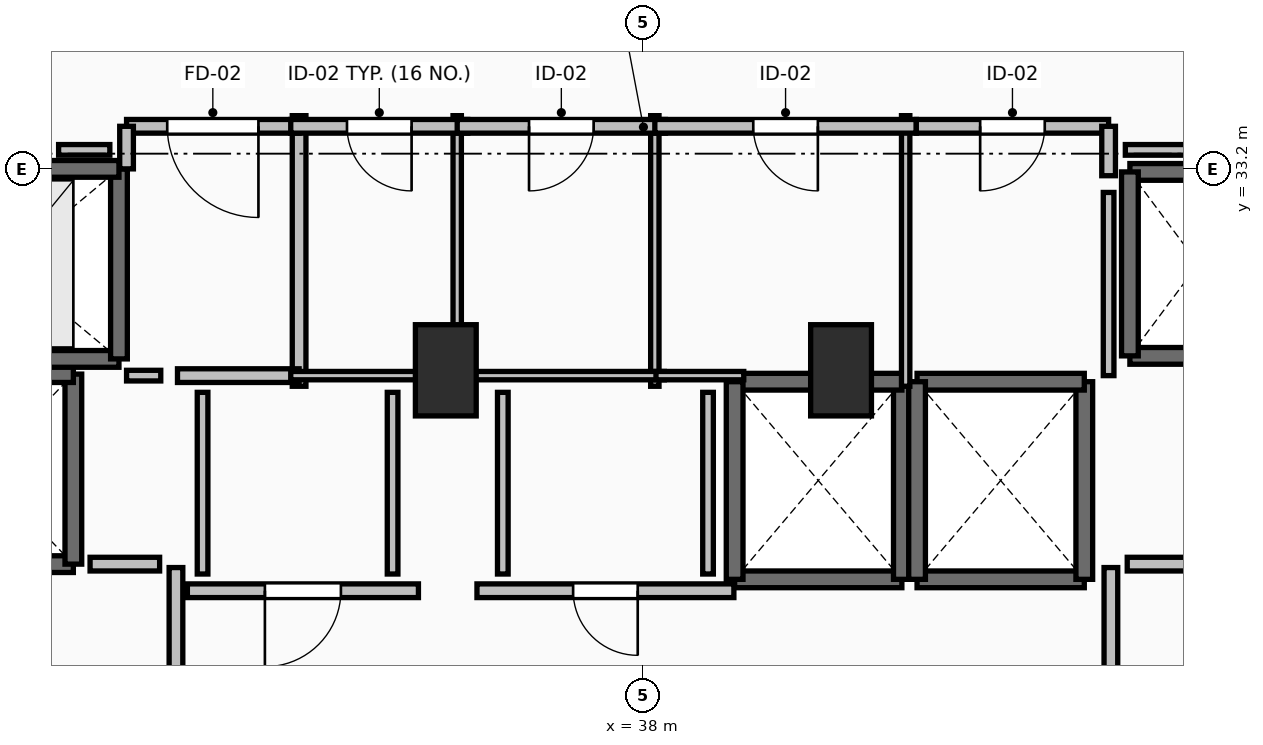
"""IFC4 building model, lengths in metres.
Left out: names, types, materials, properties, quantities, classifications, styles, units other than length and angle.
Written with IfcOpenShell. Run it as: python <this file> out.ifc"""

import sys

from ifc_helpers import new_model, si_unit, direction, frame, frame_2d, origin, origin_2d, place, context, subcontext, project, spatial, rectangle, extrude, element, fill, save


model = new_model("IFC4")
c1 = context("Model", 3, precision=1e-05, world=origin(), true_north=direction((0.0, 1.0)))
c2 = subcontext(c1, "Body", "Model", "MODEL_VIEW")
j1 = project(units=[si_unit("LENGTHUNIT", "METRE"), si_unit("PLANEANGLEUNIT", "RADIAN")], contexts=[c1])
p1 = place(None, origin())
s1 = spatial("IfcSite", under=j1, at=p1, CompositionType="ELEMENT")
p2 = place(p1, origin())
s2 = spatial("IfcBuilding", under=s1, at=p2, CompositionType="ELEMENT")
p3 = place(p2, frame((0.0, 0.0, 132.6)))
s3 = spatial("IfcBuildingStorey", under=s2, at=p3, CompositionType="ELEMENT", Elevation=132.6)
for number, where, z_axis, x_axis in (
    (1, (35.4, 30.55, 0.0), (0.0, 0.0, 1.0), (1.0, 0.0, 0.0)),
    (2, (40.6, 30.55, 0.0), (0.0, 0.0, 1.0), (1.0, 0.0, 0.0)),
):
    element("IfcColumn", number, at=place(p3, frame(where, z_axis=z_axis, x_axis=x_axis)), inside=s3, PredefinedType="PILASTER", context=c2, shape_type="SweptSolid", body=[
        extrude(rectangle(XDim=0.8, YDim=1.2, at=origin_2d()), origin(), (0.0, 0.0, 1.0), 3.5),
    ])
p4 = place(p3, frame((39.2, 27.8, 0.0), z_axis=(0.0, 0.0, 1.0), x_axis=(1.0, 0.0, 0.0)))
e3 = element("IfcWall", 3, at=p4, inside=s3, PredefinedType="SOLIDWALL", context=c2, shape_type="SweptSolid", body=[
    extrude(rectangle(XDim=2.2, YDim=0.22, at=frame_2d((1.1, 0.0))), origin(), (0.0, 0.0, 1.0), 3.24),
])
p5 = place(p3, frame((41.4, 27.8, 0.0), z_axis=(0.0, 0.0, 1.0), x_axis=(0.0, 1.0, 0.0)))
e4 = element("IfcWall", 4, at=p5, inside=s3, PredefinedType="SOLIDWALL", context=c2, shape_type="SweptSolid", body=[
    extrude(rectangle(XDim=2.6, YDim=0.22, at=frame_2d((1.3, 0.0))), origin(), (0.0, 0.0, 1.0), 3.24),
])
p6 = place(p3, frame((41.4, 30.4, 0.0), z_axis=(0.0, 0.0, 1.0), x_axis=(-1.0, 0.0, 0.0)))
e5 = element("IfcWall", 5, at=p6, inside=s3, PredefinedType="SOLIDWALL", context=c2, shape_type="SweptSolid", body=[
    extrude(rectangle(XDim=2.2, YDim=0.22, at=frame_2d((1.1, 0.0))), origin(), (0.0, 0.0, 1.0), 3.24),
])
p7 = place(p3, frame((39.2, 30.4, 0.0), z_axis=(0.0, 0.0, 1.0), x_axis=(0.0, -1.0, 0.0)))
e6 = element("IfcWall", 6, at=p7, inside=s3, PredefinedType="SOLIDWALL", context=c2, shape_type="SweptSolid", body=[
    extrude(rectangle(XDim=2.6, YDim=0.22, at=frame_2d((1.3, 0.0))), origin(), (0.0, 0.0, 1.0), 3.24),
])
p8 = place(p3, frame((41.6, 27.8, 0.0), z_axis=(0.0, 0.0, 1.0), x_axis=(1.0, 0.0, 0.0)))
e7 = element("IfcWall", 7, at=p8, inside=s3, PredefinedType="SOLIDWALL", context=c2, shape_type="SweptSolid", body=[
    extrude(rectangle(XDim=2.2, YDim=0.22, at=frame_2d((1.1, 0.0))), origin(), (0.0, 0.0, 1.0), 3.24),
])
p9 = place(p3, frame((43.8, 27.8, 0.0), z_axis=(0.0, 0.0, 1.0), x_axis=(0.0, 1.0, 0.0)))
e8 = element("IfcWall", 8, at=p9, inside=s3, PredefinedType="SOLIDWALL", context=c2, shape_type="SweptSolid", body=[
    extrude(rectangle(XDim=2.6, YDim=0.22, at=frame_2d((1.3, 0.0))), origin(), (0.0, 0.0, 1.0), 3.24),
])
p10 = place(p3, frame((43.8, 30.4, 0.0), z_axis=(0.0, 0.0, 1.0), x_axis=(-1.0, 0.0, 0.0)))
e9 = element("IfcWall", 9, at=p10, inside=s3, PredefinedType="SOLIDWALL", context=c2, shape_type="SweptSolid", body=[
    extrude(rectangle(XDim=2.2, YDim=0.22, at=frame_2d((1.1, 0.0))), origin(), (0.0, 0.0, 1.0), 3.24),
])
p11 = place(p3, frame((41.6, 30.4, 0.0), z_axis=(0.0, 0.0, 1.0), x_axis=(0.0, -1.0, 0.0)))
e10 = element("IfcWall", 10, at=p11, inside=s3, PredefinedType="SOLIDWALL", context=c2, shape_type="SweptSolid", body=[
    extrude(rectangle(XDim=2.6, YDim=0.22, at=frame_2d((1.3, 0.0))), origin(), (0.0, 0.0, 1.0), 3.24),
])
for number, where, z_axis, x_axis in (
    (11, (44.4, 30.74, 0.0), (0.0, 0.0, 1.0), (1.0, 0.0, 0.0)),
    (12, (46.2, 33.16, 0.0), (0.0, 0.0, 1.0), (-1.0, 0.0, 0.0)),
):
    element("IfcWall", number, at=place(p3, frame(where, z_axis=z_axis, x_axis=x_axis)), inside=s3, PredefinedType="SOLIDWALL", context=c2, shape_type="SweptSolid", body=[
        extrude(rectangle(XDim=1.8, YDim=0.22, at=frame_2d((0.9, 0.0))), origin(), (0.0, 0.0, 1.0), 3.24),
    ])
p12 = place(p3, frame((44.4, 33.16, 0.0), z_axis=(0.0, 0.0, 1.0), x_axis=(0.0, -1.0, 0.0)))
e13 = element("IfcWall", 13, at=p12, inside=s3, PredefinedType="SOLIDWALL", context=c2, shape_type="SweptSolid", body=[
    extrude(rectangle(XDim=2.42, YDim=0.22, at=frame_2d((1.21, 0.0))), origin(), (0.0, 0.0, 1.0), 3.24),
])
p13 = place(p3, frame((28.1, 28.0, 0.0), z_axis=(0.0, 0.0, 1.0), x_axis=(1.0, 0.0, 0.0)))
e14 = element("IfcWall", 14, at=p13, inside=s3, PredefinedType="SHEAR", context=c2, shape_type="SweptSolid", body=[
    extrude(rectangle(XDim=2.4, YDim=0.22, at=frame_2d((1.2, 0.0))), origin(), (0.0, 0.0, 1.0), 3.24),
])
p14 = place(p13, frame((0.6, 0.0, 0.0)))
e15 = element("IfcOpeningElement", 15, at=p14, cuts=e14, PredefinedType="OPENING", context=c2, shape_type="SweptSolid", body=[
    extrude(rectangle(XDim=1.2, YDim=2.2, at=frame_2d((0.6, 1.1))), frame((0.0, 0.125, 0.0), z_axis=(0.0, -1.0, 0.0), x_axis=(1.0, 0.0, 0.0)), (0.0, 0.0, 1.0), 0.25),
])
p15 = place(p3, frame((30.5, 28.0, 0.0), z_axis=(0.0, 0.0, 1.0), x_axis=(0.0, 1.0, 0.0)))
e16 = element("IfcWall", 16, at=p15, inside=s3, PredefinedType="SHEAR", context=c2, shape_type="SweptSolid", body=[
    extrude(rectangle(XDim=2.5, YDim=0.22, at=frame_2d((1.25, 0.0))), origin(), (0.0, 0.0, 1.0), 3.24),
])
p16 = place(p3, frame((30.5, 30.5, 0.0), z_axis=(0.0, 0.0, 1.0), x_axis=(-1.0, 0.0, 0.0)))
e17 = element("IfcWall", 17, at=p16, inside=s3, PredefinedType="SHEAR", context=c2, shape_type="SweptSolid", body=[
    extrude(rectangle(XDim=2.4, YDim=0.22, at=frame_2d((1.2, 0.0))), origin(), (0.0, 0.0, 1.0), 3.24),
])
p17 = place(p3, frame((28.1, 30.7, 0.0), z_axis=(0.0, 0.0, 1.0), x_axis=(1.0, 0.0, 0.0)))
e18 = element("IfcWall", 18, at=p17, inside=s3, PredefinedType="SOLIDWALL", context=c2, shape_type="SweptSolid", body=[
    extrude(rectangle(XDim=3.0, YDim=0.22, at=frame_2d((1.5, 0.0))), origin(), (0.0, 0.0, 1.0), 3.24),
])
p18 = place(p3, frame((31.1, 30.7, 0.0), z_axis=(0.0, 0.0, 1.0), x_axis=(0.0, 1.0, 0.0)))
e19 = element("IfcWall", 19, at=p18, inside=s3, PredefinedType="SOLIDWALL", context=c2, shape_type="SweptSolid", body=[
    extrude(rectangle(XDim=2.5, YDim=0.22, at=frame_2d((1.25, 0.0))), origin(), (0.0, 0.0, 1.0), 3.24),
])
p19 = place(p3, frame((31.1, 33.2, 0.0), z_axis=(0.0, 0.0, 1.0), x_axis=(-1.0, 0.0, 0.0)))
e20 = element("IfcWall", 20, at=p19, inside=s3, PredefinedType="SOLIDWALL", context=c2, shape_type="SweptSolid", body=[
    extrude(rectangle(XDim=3.0, YDim=0.22, at=frame_2d((1.5, 0.0))), origin(), (0.0, 0.0, 1.0), 3.24),
])
p20 = place(p19, frame((0.9, 0.0, 0.0)))
e21 = element("IfcOpeningElement", 21, at=p20, cuts=e20, PredefinedType="OPENING", context=c2, shape_type="SweptSolid", body=[
    extrude(rectangle(XDim=1.2, YDim=2.2, at=frame_2d((0.6, 1.1))), frame((0.0, 0.125, 0.0), z_axis=(0.0, -1.0, 0.0), x_axis=(1.0, 0.0, 0.0)), (0.0, 0.0, 1.0), 0.25),
])
p21 = place(p3, frame((31.85, 24.045, 0.0), z_axis=(0.0, 0.0, 1.0), x_axis=(0.0, 1.0, 0.0)))
e22 = element("IfcWall", 22, at=p21, inside=s3, PredefinedType="PARTITIONING", context=c2, shape_type="SweptSolid", body=[
    extrude(rectangle(XDim=3.91, YDim=0.18, at=frame_2d((1.955, 0.0))), origin(), (0.0, 0.0, 1.0), 3.24),
])
p22 = place(p21, frame((1.355, 0.0, 0.0)))
e23 = element("IfcOpeningElement", 23, at=p22, cuts=e22, PredefinedType="OPENING", context=c2, shape_type="SweptSolid", body=[
    extrude(rectangle(XDim=1.2, YDim=2.15, at=frame_2d((0.6, 1.075))), frame((0.0, 0.105, 0.0), z_axis=(0.0, -1.0, 0.0), x_axis=(1.0, 0.0, 0.0)), (0.0, 0.0, 1.0), 0.21),
])
p23 = place(p3, frame((44.15, 27.955, 0.0), z_axis=(0.0, 0.0, 1.0), x_axis=(0.0, -1.0, 0.0)))
e24 = element("IfcWall", 24, at=p23, inside=s3, PredefinedType="PARTITIONING", context=c2, shape_type="SweptSolid", body=[
    extrude(rectangle(XDim=3.91, YDim=0.18, at=frame_2d((1.955, 0.0))), origin(), (0.0, 0.0, 1.0), 3.24),
])
p24 = place(p23, frame((1.355, 0.0, 0.0)))
e25 = element("IfcOpeningElement", 25, at=p24, cuts=e24, PredefinedType="OPENING", context=c2, shape_type="SweptSolid", body=[
    extrude(rectangle(XDim=1.2, YDim=2.15, at=frame_2d((0.6, 1.075))), frame((0.0, 0.105, 0.0), z_axis=(0.0, -1.0, 0.0), x_axis=(1.0, 0.0, 0.0)), (0.0, 0.0, 1.0), 0.21),
])
p25 = place(p3, frame((33.47, 30.34, 0.0), z_axis=(0.0, 0.0, 1.0), x_axis=(0.0, 1.0, 0.0)))
e26 = element("IfcWall", 26, at=p25, inside=s3, PredefinedType="PARTITIONING", context=c2, shape_type="SweptSolid", body=[
    extrude(rectangle(XDim=3.56, YDim=0.18, at=frame_2d((1.78, 0.0))), origin(), (0.0, 0.0, 1.0), 3.24),
])
p26 = place(p3, frame((31.87, 30.48, 0.0), z_axis=(0.0, 0.0, 1.0), x_axis=(1.0, 0.0, 0.0)))
e27 = element("IfcWall", 27, at=p26, inside=s3, PredefinedType="PARTITIONING", context=c2, shape_type="SweptSolid", body=[
    extrude(rectangle(XDim=1.6, YDim=0.18, at=frame_2d((0.8, 0.0))), origin(), (0.0, 0.0, 1.0), 3.24),
])
p27 = place(p3, frame((33.47, 33.76, 0.0), z_axis=(0.0, 0.0, 1.0), x_axis=(-1.0, 0.0, 0.0)))
e28 = element("IfcWall", 28, at=p27, inside=s3, PredefinedType="PARTITIONING", context=c2, shape_type="SweptSolid", body=[
    extrude(rectangle(XDim=2.27, YDim=0.18, at=frame_2d((1.135, 0.0))), origin(), (0.0, 0.0, 1.0), 3.24),
])
p28 = place(p27, frame((0.535, 0.0, 0.0)))
e29 = element("IfcOpeningElement", 29, at=p28, cuts=e28, PredefinedType="OPENING", context=c2, shape_type="SweptSolid", body=[
    extrude(rectangle(XDim=1.2, YDim=2.15, at=frame_2d((0.6, 1.075))), frame((0.0, 0.105, 0.0), z_axis=(0.0, -1.0, 0.0), x_axis=(1.0, 0.0, 0.0)), (0.0, 0.0, 1.0), 0.21),
])
p29 = place(p3, frame((31.2, 33.76, 0.0), z_axis=(0.0, 0.0, 1.0), x_axis=(0.0, -1.0, 0.0)))
e30 = element("IfcWall", 30, at=p29, inside=s3, PredefinedType="PARTITIONING", context=c2, shape_type="SweptSolid", body=[
    extrude(rectangle(XDim=0.56, YDim=0.18, at=frame_2d((0.28, 0.0))), origin(), (0.0, 0.0, 1.0), 3.24),
])
p30 = place(p3, frame((35.04, 27.65, 0.0), z_axis=(0.0, 0.0, 1.0), x_axis=(-1.0, 0.0, 0.0)))
e31 = element("IfcWall", 31, at=p30, inside=s3, PredefinedType="PARTITIONING", context=c2, shape_type="SweptSolid", body=[
    extrude(rectangle(XDim=3.04, YDim=0.18, at=frame_2d((1.52, 0.0))), origin(), (0.0, 0.0, 1.0), 3.24),
])
p31 = place(p30, frame((1.02, 0.0, 0.0)))
e32 = element("IfcOpeningElement", 32, at=p31, cuts=e31, PredefinedType="OPENING", context=c2, shape_type="SweptSolid", body=[
    extrude(rectangle(XDim=1.0, YDim=2.15, at=frame_2d((0.5, 1.075))), frame((0.0, 0.105, 0.0), z_axis=(0.0, -1.0, 0.0), x_axis=(1.0, 0.0, 0.0)), (0.0, 0.0, 1.0), 0.21),
])
p32 = place(p3, frame((39.19, 27.65, 0.0), z_axis=(0.0, 0.0, 1.0), x_axis=(-1.0, 0.0, 0.0)))
e33 = element("IfcWall", 33, at=p32, inside=s3, PredefinedType="PARTITIONING", context=c2, shape_type="SweptSolid", body=[
    extrude(rectangle(XDim=3.38, YDim=0.18, at=frame_2d((1.69, 0.0))), origin(), (0.0, 0.0, 1.0), 3.24),
])
p33 = place(p32, frame((1.265, 0.0, 0.0)))
e34 = element("IfcOpeningElement", 34, at=p33, cuts=e33, PredefinedType="OPENING", context=c2, shape_type="SweptSolid", body=[
    extrude(rectangle(XDim=0.85, YDim=2.1, at=frame_2d((0.425, 1.05))), frame((0.0, 0.105, 0.0), z_axis=(0.0, -1.0, 0.0), x_axis=(1.0, 0.0, 0.0)), (0.0, 0.0, 1.0), 0.21),
])
p34 = place(p3, frame((35.55, 30.34, 0.0), z_axis=(0.0, 0.0, 1.0), x_axis=(0.0, 1.0, 0.0)))
e35 = element("IfcWall", 35, at=p34, inside=s3, PredefinedType="PARTITIONING", context=c2, shape_type="SweptSolid", body=[
    extrude(rectangle(XDim=3.56, YDim=0.11, at=frame_2d((1.78, 0.0))), origin(), (0.0, 0.0, 1.0), 2.432),
])
p35 = place(p3, frame((33.36, 30.48, 0.0), z_axis=(0.0, 0.0, 1.0), x_axis=(1.0, 0.0, 0.0)))
e36 = element("IfcWall", 36, at=p35, inside=s3, PredefinedType="PARTITIONING", context=c2, shape_type="SweptSolid", body=[
    extrude(rectangle(XDim=1.81, YDim=0.11, at=frame_2d((0.905, 0.0))), origin(), (0.0, 0.0, 1.0), 3.24),
])
p36 = place(p3, frame((35.69, 33.76, 0.0), z_axis=(0.0, 0.0, 1.0), x_axis=(-1.0, 0.0, 0.0)))
e37 = element("IfcWall", 37, at=p36, inside=s3, PredefinedType="PARTITIONING", context=c2, shape_type="SweptSolid", body=[
    extrude(rectangle(XDim=2.33, YDim=0.18, at=frame_2d((1.165, 0.0))), origin(), (0.0, 0.0, 1.0), 3.24),
])
p37 = place(p36, frame((0.74, 0.0, 0.0)))
e38 = element("IfcOpeningElement", 38, at=p37, cuts=e37, PredefinedType="OPENING", context=c2, shape_type="SweptSolid", body=[
    extrude(rectangle(XDim=0.85, YDim=2.1, at=frame_2d((0.425, 1.05))), frame((0.0, 0.105, 0.0), z_axis=(0.0, -1.0, 0.0), x_axis=(1.0, 0.0, 0.0)), (0.0, 0.0, 1.0), 0.21),
])
p38 = place(p3, frame((38.15, 30.34, 0.0), z_axis=(0.0, 0.0, 1.0), x_axis=(0.0, 1.0, 0.0)))
e39 = element("IfcWall", 39, at=p38, inside=s3, PredefinedType="PARTITIONING", context=c2, shape_type="SweptSolid", body=[
    extrude(rectangle(XDim=3.56, YDim=0.11, at=frame_2d((1.78, 0.0))), origin(), (0.0, 0.0, 1.0), 2.432),
])
p39 = place(p3, frame((35.68, 30.48, 0.0), z_axis=(0.0, 0.0, 1.0), x_axis=(1.0, 0.0, 0.0)))
e40 = element("IfcWall", 40, at=p39, inside=s3, PredefinedType="PARTITIONING", context=c2, shape_type="SweptSolid", body=[
    extrude(rectangle(XDim=2.595, YDim=0.11, at=frame_2d((1.297, 0.0))), origin(), (0.0, 0.0, 1.0), 2.432),
])
p40 = place(p3, frame((38.29, 33.76, 0.0), z_axis=(0.0, 0.0, 1.0), x_axis=(-1.0, 0.0, 0.0)))
e41 = element("IfcWall", 41, at=p40, inside=s3, PredefinedType="PARTITIONING", context=c2, shape_type="SweptSolid", body=[
    extrude(rectangle(XDim=2.74, YDim=0.18, at=frame_2d((1.37, 0.0))), origin(), (0.0, 0.0, 1.0), 3.24),
])
p41 = place(p40, frame((0.945, 0.0, 0.0)))
e42 = element("IfcOpeningElement", 42, at=p41, cuts=e41, PredefinedType="OPENING", context=c2, shape_type="SweptSolid", body=[
    extrude(rectangle(XDim=0.85, YDim=2.1, at=frame_2d((0.425, 1.05))), frame((0.0, 0.105, 0.0), z_axis=(0.0, -1.0, 0.0), x_axis=(1.0, 0.0, 0.0)), (0.0, 0.0, 1.0), 0.21),
])
p42 = place(p3, frame((41.45, 30.34, 0.0), z_axis=(0.0, 0.0, 1.0), x_axis=(0.0, 1.0, 0.0)))
e43 = element("IfcWall", 43, at=p42, inside=s3, PredefinedType="PARTITIONING", context=c2, shape_type="SweptSolid", body=[
    extrude(rectangle(XDim=3.56, YDim=0.11, at=frame_2d((1.78, 0.0))), origin(), (0.0, 0.0, 1.0), 3.24),
])
p43 = place(p3, frame((38.165, 30.48, 0.0), z_axis=(0.0, 0.0, 1.0), x_axis=(1.0, 0.0, 0.0)))
e44 = element("IfcWall", 44, at=p43, inside=s3, PredefinedType="PARTITIONING", context=c2, shape_type="SweptSolid", body=[
    extrude(rectangle(XDim=1.155, YDim=0.11, at=frame_2d((0.578, 0.0))), origin(), (0.0, 0.0, 1.0), 2.432),
])
p44 = place(p3, frame((41.59, 33.76, 0.0), z_axis=(0.0, 0.0, 1.0), x_axis=(-1.0, 0.0, 0.0)))
e45 = element("IfcWall", 45, at=p44, inside=s3, PredefinedType="PARTITIONING", context=c2, shape_type="SweptSolid", body=[
    extrude(rectangle(XDim=3.44, YDim=0.18, at=frame_2d((1.72, 0.0))), origin(), (0.0, 0.0, 1.0), 3.24),
])
p45 = place(p44, frame((1.295, 0.0, 0.0)))
e46 = element("IfcOpeningElement", 46, at=p45, cuts=e45, PredefinedType="OPENING", context=c2, shape_type="SweptSolid", body=[
    extrude(rectangle(XDim=0.85, YDim=2.1, at=frame_2d((0.425, 1.05))), frame((0.0, 0.105, 0.0), z_axis=(0.0, -1.0, 0.0), x_axis=(1.0, 0.0, 0.0)), (0.0, 0.0, 1.0), 0.21),
])
p46 = place(p3, frame((44.12, 33.76, 0.0), z_axis=(0.0, 0.0, 1.0), x_axis=(-1.0, 0.0, 0.0)))
e47 = element("IfcWall", 47, at=p46, inside=s3, PredefinedType="PARTITIONING", context=c2, shape_type="SweptSolid", body=[
    extrude(rectangle(XDim=2.53, YDim=0.18, at=frame_2d((1.265, 0.0))), origin(), (0.0, 0.0, 1.0), 3.24),
])
p47 = place(p46, frame((0.84, 0.0, 0.0)))
e48 = element("IfcOpeningElement", 48, at=p47, cuts=e47, PredefinedType="OPENING", context=c2, shape_type="SweptSolid", body=[
    extrude(rectangle(XDim=0.85, YDim=2.1, at=frame_2d((0.425, 1.05))), frame((0.0, 0.105, 0.0), z_axis=(0.0, -1.0, 0.0), x_axis=(1.0, 0.0, 0.0)), (0.0, 0.0, 1.0), 0.21),
])
p48 = place(p3, frame((44.12, 33.11, 0.0), z_axis=(0.0, 0.0, 1.0), x_axis=(0.0, 1.0, 0.0)))
e49 = element("IfcWall", 49, at=p48, inside=s3, PredefinedType="PARTITIONING", context=c2, shape_type="SweptSolid", body=[
    extrude(rectangle(XDim=0.65, YDim=0.18, at=frame_2d((0.325, 0.0))), origin(), (0.0, 0.0, 1.0), 3.24),
])
for number, where, z_axis, x_axis in (
    (50, (31.635, 28.0, 0.0), (0.0, 0.0, 1.0), (-1.0, 0.0, 0.0)),
    (51, (45.28, 28.0, 0.0), (0.0, 0.0, 1.0), (-1.0, 0.0, 0.0)),
):
    element("IfcWall", number, at=place(p3, frame(where, z_axis=z_axis, x_axis=x_axis)), inside=s3, PredefinedType="PARTITIONING", context=c2, shape_type="SweptSolid", body=[
        extrude(rectangle(XDim=0.915, YDim=0.18, at=frame_2d((0.458, 0.0))), origin(), (0.0, 0.0, 1.0), 3.24),
    ])
p49 = place(p3, frame((31.2, 30.48, 0.0), z_axis=(0.0, 0.0, 1.0), x_axis=(1.0, 0.0, 0.0)))
e52 = element("IfcWall", 52, at=p49, inside=s3, PredefinedType="PARTITIONING", context=c2, shape_type="SweptSolid", body=[
    extrude(rectangle(XDim=0.45, YDim=0.14, at=frame_2d((0.225, 0.0))), origin(), (0.0, 0.0, 1.0), 3.24),
])
p50 = place(p3, frame((44.12, 30.48, 0.0), z_axis=(0.0, 0.0, 1.0), x_axis=(0.0, 1.0, 0.0)))
e53 = element("IfcWall", 53, at=p50, inside=s3, PredefinedType="PARTITIONING", context=c2, shape_type="SweptSolid", body=[
    extrude(rectangle(XDim=2.41, YDim=0.14, at=frame_2d((1.205, 0.0))), origin(), (0.0, 0.0, 1.0), 3.24),
])
for number, where, z_axis, x_axis in (
    (54, (32.2, 30.26, 0.0), (0.0, 0.0, 1.0), (0.0, -1.0, 0.0)),
    (55, (34.7, 27.87, 0.0), (0.0, 0.0, 1.0), (0.0, 1.0, 0.0)),
    (56, (36.15, 30.26, 0.0), (0.0, 0.0, 1.0), (0.0, -1.0, 0.0)),
    (57, (38.85, 27.87, 0.0), (0.0, 0.0, 1.0), (0.0, 1.0, 0.0)),
):
    element("IfcWall", number, at=place(p3, frame(where, z_axis=z_axis, x_axis=x_axis)), inside=s3, PredefinedType="PARTITIONING", context=c2, shape_type="SweptSolid", body=[
        extrude(rectangle(XDim=2.39, YDim=0.14, at=frame_2d((1.195, 0.0))), origin(), (0.0, 0.0, 1.0), 3.24),
    ])
p51 = place(p3, frame((48.55, 33.45, 0.0), z_axis=(0.0, 0.0, 1.0), x_axis=(-1.0, 0.0, 0.0)))
e58 = element("IfcWall", 58, at=p51, inside=s3, PredefinedType="PARTITIONING", context=c2, shape_type="SweptSolid", body=[
    extrude(rectangle(XDim=4.21, YDim=0.14, at=frame_2d((2.105, 0.0))), origin(), (0.0, 0.0, 1.0), 2.432),
])
p52 = place(p3, frame((30.98, 33.45, 0.0), z_axis=(0.0, 0.0, 1.0), x_axis=(-1.0, 0.0, 0.0)))
e59 = element("IfcWall", 59, at=p52, inside=s3, PredefinedType="PARTITIONING", context=c2, shape_type="SweptSolid", body=[
    extrude(rectangle(XDim=0.674, YDim=0.14, at=frame_2d((0.337, 0.0))), origin(), (0.0, 0.0, 1.0), 3.24),
])
p53 = place(p28, origin())
e60 = element("IfcDoor", 60, at=p53, inside=s3, OperationType="SINGLE_SWING_LEFT", PredefinedType="DOOR", context=c2, shape_type="SweptSolid", body=[
    extrude(rectangle(XDim=1.2, YDim=2.15, at=frame_2d((0.6, 1.075))), frame((0.0, 0.025, 0.0), z_axis=(0.0, -1.0, 0.0), x_axis=(1.0, 0.0, 0.0)), (0.0, 0.0, 1.0), 0.05),
])
fill(e29, e60)
p54 = place(p31, origin())
e61 = element("IfcDoor", 61, at=p54, inside=s3, OperationType="SINGLE_SWING_RIGHT", PredefinedType="DOOR", context=c2, shape_type="SweptSolid", body=[
    extrude(rectangle(XDim=1.0, YDim=2.15, at=frame_2d((0.5, 1.075))), frame((0.0, 0.025, 0.0), z_axis=(0.0, -1.0, 0.0), x_axis=(1.0, 0.0, 0.0)), (0.0, 0.0, 1.0), 0.05),
])
fill(e32, e61)
p55 = place(p33, origin())
e62 = element("IfcDoor", 62, at=p55, inside=s3, OperationType="SINGLE_SWING_LEFT", PredefinedType="DOOR", context=c2, shape_type="SweptSolid", body=[
    extrude(rectangle(XDim=0.85, YDim=2.1, at=frame_2d((0.425, 1.05))), frame((0.0, 0.025, 0.0), z_axis=(0.0, -1.0, 0.0), x_axis=(1.0, 0.0, 0.0)), (0.0, 0.0, 1.0), 0.05),
])
fill(e34, e62)
p56 = place(p37, origin())
e63 = element("IfcDoor", 63, at=p56, inside=s3, OperationType="SINGLE_SWING_LEFT", PredefinedType="DOOR", context=c2, shape_type="SweptSolid", body=[
    extrude(rectangle(XDim=0.85, YDim=2.1, at=frame_2d((0.425, 1.05))), frame((0.0, 0.025, 0.0), z_axis=(0.0, -1.0, 0.0), x_axis=(1.0, 0.0, 0.0)), (0.0, 0.0, 1.0), 0.05),
])
fill(e38, e63)
p57 = place(p41, origin())
e64 = element("IfcDoor", 64, at=p57, inside=s3, OperationType="SINGLE_SWING_RIGHT", PredefinedType="DOOR", context=c2, shape_type="SweptSolid", body=[
    extrude(rectangle(XDim=0.85, YDim=2.1, at=frame_2d((0.425, 1.05))), frame((0.0, 0.025, 0.0), z_axis=(0.0, -1.0, 0.0), x_axis=(1.0, 0.0, 0.0)), (0.0, 0.0, 1.0), 0.05),
])
fill(e42, e64)
p58 = place(p45, origin())
e65 = element("IfcDoor", 65, at=p58, inside=s3, OperationType="SINGLE_SWING_LEFT", PredefinedType="DOOR", context=c2, shape_type="SweptSolid", body=[
    extrude(rectangle(XDim=0.85, YDim=2.1, at=frame_2d((0.425, 1.05))), frame((0.0, 0.025, 0.0), z_axis=(0.0, -1.0, 0.0), x_axis=(1.0, 0.0, 0.0)), (0.0, 0.0, 1.0), 0.05),
])
fill(e46, e65)
p59 = place(p47, origin())
e66 = element("IfcDoor", 66, at=p59, inside=s3, OperationType="SINGLE_SWING_RIGHT", PredefinedType="DOOR", context=c2, shape_type="SweptSolid", body=[
    extrude(rectangle(XDim=0.85, YDim=2.1, at=frame_2d((0.425, 1.05))), frame((0.0, 0.025, 0.0), z_axis=(0.0, -1.0, 0.0), x_axis=(1.0, 0.0, 0.0)), (0.0, 0.0, 1.0), 0.05),
])
fill(e48, e66)
save(model, sys.argv[1])
